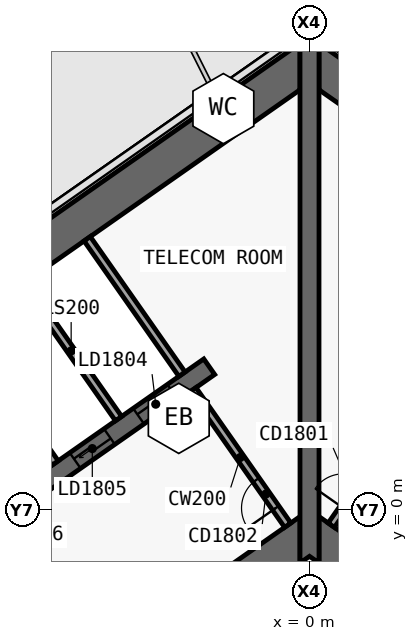
"""IFC4 building model, lengths in metres.
Left out: names, types, materials, properties, quantities, classifications, styles, units other than length and angle.
Written with IfcOpenShell. Run it as: python <this file> out.ifc"""

import sys

from ifc_helpers import new_model, si_unit, direction, frame, frame_2d, origin, place, context, subcontext, project, spatial, polyline, rectangle, outline, extrude, element, fill, save


model = new_model("IFC4")
c1 = context("Model", 3, precision=1e-05, world=origin(), true_north=direction((0.0, 1.0)))
c2 = subcontext(c1, "Body", "Model", "MODEL_VIEW")
j1 = project(units=[si_unit("LENGTHUNIT", "METRE"), si_unit("PLANEANGLEUNIT", "RADIAN")], contexts=[c1])
p1 = place(None, origin())
s1 = spatial("IfcSite", under=j1, at=p1, CompositionType="ELEMENT")
p2 = place(p1, origin())
s2 = spatial("IfcBuilding", under=s1, at=p2, CompositionType="ELEMENT")
p3 = place(p2, frame((0.0, 0.0, 97.7)))
s3 = spatial("IfcBuildingStorey", under=s2, at=p3, CompositionType="ELEMENT", Elevation=97.7)
p4 = place(p3, frame((0.037, 11.867, 0.0), z_axis=(0.0, 0.0, 1.0), x_axis=(-0.819155306259, -0.573571777746, 0.0)))
e1 = element("IfcWall", 1, at=p4, inside=s3, PredefinedType="SHEAR", context=c2, shape_type="SweptSolid", body=[
    extrude(outline(polyline([(33.837, 0.5), (0.7, 0.5), (0.0, -0.5), (33.837, -0.5), (33.837, 0.5)])), origin(), (0.0, 0.0, 1.0), 3.6),
])
p5 = place(p3, frame((0.037, -0.585, 0.0), z_axis=(0.0, 0.0, 1.0), x_axis=(-0.819157152511, -0.573569140985, 0.0)))
e2 = element("IfcWall", 2, at=p5, inside=s3, PredefinedType="SHEAR", context=c2, shape_type="SweptSolid", body=[
    extrude(outline(polyline([(26.695, 0.5), (0.7, 0.5), (0.0, -0.5), (26.695, -0.5), (26.695, 0.5)])), origin(), (0.0, 0.0, 1.0), 3.6),
])
p6 = place(p5, frame((2.995, 0.0, 0.0)))
e3 = element("IfcOpeningElement", 3, at=p6, cuts=e2, PredefinedType="OPENING", context=c2, shape_type="SweptSolid", body=[
    extrude(rectangle(XDim=2.4, YDim=2.1, at=frame_2d((1.2, 1.05))), frame((0.0, 0.51, 0.0), z_axis=(0.0, -1.0, 0.0), x_axis=(1.0, 0.0, 0.0)), (0.0, 0.0, 1.0), 1.02),
])
p7 = place(p5, frame((11.995, 0.0, 0.0)))
e4 = element("IfcOpeningElement", 4, at=p7, cuts=e2, PredefinedType="OPENING", context=c2, shape_type="SweptSolid", body=[
    extrude(rectangle(XDim=2.4, YDim=2.1, at=frame_2d((1.2, 1.05))), frame((0.0, 0.51, 0.0), z_axis=(0.0, -1.0, 0.0), x_axis=(1.0, 0.0, 0.0)), (0.0, 0.0, 1.0), 1.02),
])
p8 = place(p3, frame((-2.638, 3.768, 0.0), z_axis=(0.0, 0.0, 1.0), x_axis=(-0.819148977158, -0.573580816643, 0.0)))
e5 = element("IfcWall", 5, at=p8, inside=s3, PredefinedType="SHEAR", context=c2, shape_type="SweptSolid", body=[
    extrude(outline(polyline([(26.0, 0.25), (0.0, 0.25), (0.0, -0.25), (26.0, -0.25), (26.0, 0.25)])), origin(), (0.0, 0.0, 1.0), 3.6),
])
p9 = place(p8, frame((1.169, 0.0, 0.0)))
e6 = element("IfcOpeningElement", 6, at=p9, cuts=e5, PredefinedType="OPENING", context=c2, shape_type="SweptSolid", body=[
    extrude(rectangle(XDim=1.1, YDim=2.1, at=frame_2d((0.55, 1.05))), frame((0.0, 0.26, 0.0), z_axis=(0.0, -1.0, 0.0), x_axis=(1.0, 0.0, 0.0)), (0.0, 0.0, 1.0), 0.52),
])
p10 = place(p8, frame((3.206, 0.0, 0.0)))
e7 = element("IfcOpeningElement", 7, at=p10, cuts=e5, PredefinedType="OPENING", context=c2, shape_type="SweptSolid", body=[
    extrude(rectangle(XDim=1.1, YDim=2.1, at=frame_2d((0.55, 1.05))), frame((0.0, 0.26, 0.0), z_axis=(0.0, -1.0, 0.0), x_axis=(1.0, 0.0, 0.0)), (0.0, 0.0, 1.0), 0.52),
])
p11 = place(p8, frame((5.244, 0.0, 0.0)))
e8 = element("IfcOpeningElement", 8, at=p11, cuts=e5, PredefinedType="OPENING", context=c2, shape_type="SweptSolid", body=[
    extrude(rectangle(XDim=1.1, YDim=2.1, at=frame_2d((0.55, 1.05))), frame((0.0, 0.26, 0.0), z_axis=(0.0, -1.0, 0.0), x_axis=(1.0, 0.0, 0.0)), (0.0, 0.0, 1.0), 0.52),
])
p12 = place(p8, frame((7.281, 0.0, 0.0)))
e9 = element("IfcOpeningElement", 9, at=p12, cuts=e5, PredefinedType="OPENING", context=c2, shape_type="SweptSolid", body=[
    extrude(rectangle(XDim=1.1, YDim=2.1, at=frame_2d((0.55, 1.05))), frame((0.0, 0.26, 0.0), z_axis=(0.0, -1.0, 0.0), x_axis=(1.0, 0.0, 0.0)), (0.0, 0.0, 1.0), 0.52),
])
p13 = place(p8, frame((9.688, 0.0, 0.0)))
e10 = element("IfcOpeningElement", 10, at=p13, cuts=e5, PredefinedType="OPENING", context=c2, shape_type="SweptSolid", body=[
    extrude(rectangle(XDim=1.1, YDim=2.1, at=frame_2d((0.55, 1.05))), frame((0.0, 0.26, 0.0), z_axis=(0.0, -1.0, 0.0), x_axis=(1.0, 0.0, 0.0)), (0.0, 0.0, 1.0), 0.52),
])
p14 = place(p8, frame((11.863, 0.0, 0.0)))
e11 = element("IfcOpeningElement", 11, at=p14, cuts=e5, PredefinedType="OPENING", context=c2, shape_type="SweptSolid", body=[
    extrude(rectangle(XDim=1.1, YDim=2.1, at=frame_2d((0.55, 1.05))), frame((0.0, 0.26, 0.0), z_axis=(0.0, -1.0, 0.0), x_axis=(1.0, 0.0, 0.0)), (0.0, 0.0, 1.0), 0.52),
])
p15 = place(p8, frame((14.038, 0.0, 0.0)))
e12 = element("IfcOpeningElement", 12, at=p15, cuts=e5, PredefinedType="OPENING", context=c2, shape_type="SweptSolid", body=[
    extrude(rectangle(XDim=1.1, YDim=2.1, at=frame_2d((0.55, 1.05))), frame((0.0, 0.26, 0.0), z_axis=(0.0, -1.0, 0.0), x_axis=(1.0, 0.0, 0.0)), (0.0, 0.0, 1.0), 0.52),
])
p16 = place(p8, frame((16.212, 0.0, 0.0)))
e13 = element("IfcOpeningElement", 13, at=p16, cuts=e5, PredefinedType="OPENING", context=c2, shape_type="SweptSolid", body=[
    extrude(rectangle(XDim=1.1, YDim=2.1, at=frame_2d((0.55, 1.05))), frame((0.0, 0.26, 0.0), z_axis=(0.0, -1.0, 0.0), x_axis=(1.0, 0.0, 0.0)), (0.0, 0.0, 1.0), 0.52),
])
p17 = place(p3, frame((-0.037, 11.867, 0.0), z_axis=(0.0, 0.0, 1.0), x_axis=(0.819155306259, -0.573571777746, 0.0)))
e14 = element("IfcWall", 14, at=p17, inside=s3, PredefinedType="SHEAR", context=c2, shape_type="SweptSolid", body=[
    extrude(outline(polyline([(33.837, 0.5), (0.0, 0.5), (0.7, -0.5), (33.837, -0.5), (33.837, 0.5)])), origin(), (0.0, 0.0, 1.0), 3.6),
])
p18 = place(p3, frame((-0.037, -0.585, 0.0), z_axis=(0.0, 0.0, 1.0), x_axis=(0.819157152511, -0.573569140985, 0.0)))
e15 = element("IfcWall", 15, at=p18, inside=s3, PredefinedType="SHEAR", context=c2, shape_type="SweptSolid", body=[
    extrude(outline(polyline([(26.695, 0.5), (0.0, 0.5), (0.7, -0.5), (26.695, -0.5), (26.695, 0.5)])), origin(), (0.0, 0.0, 1.0), 3.6),
])
p19 = place(p18, frame((1.245, 0.0, 0.0)))
e16 = element("IfcOpeningElement", 16, at=p19, cuts=e15, PredefinedType="OPENING", context=c2, shape_type="SweptSolid", body=[
    extrude(rectangle(XDim=1.5, YDim=2.1, at=frame_2d((0.75, 1.05))), frame((0.0, 0.51, 0.0), z_axis=(0.0, -1.0, 0.0), x_axis=(1.0, 0.0, 0.0)), (0.0, 0.0, 1.0), 1.02),
])
p20 = place(p18, frame((12.445, 0.0, 0.0)))
e17 = element("IfcOpeningElement", 17, at=p20, cuts=e15, PredefinedType="OPENING", context=c2, shape_type="SweptSolid", body=[
    extrude(rectangle(XDim=1.5, YDim=2.1, at=frame_2d((0.75, 1.05))), frame((0.0, 0.51, 0.0), z_axis=(0.0, -1.0, 0.0), x_axis=(1.0, 0.0, 0.0)), (0.0, 0.0, 1.0), 1.02),
])
p21 = place(p3, frame((0.0, -1.396, 0.0), z_axis=(0.0, 0.0, 1.0), x_axis=(0.0, 1.0, 0.0)))
e18 = element("IfcWall", 18, at=p21, inside=s3, PredefinedType="SHEAR", context=c2, shape_type="SweptSolid", body=[
    extrude(outline(polyline([(0.0, -0.25), (0.175, -0.25), (1.221, -0.25), (12.452, -0.25), (13.848, -0.25), (13.857, -0.25), (13.968, -0.172), (13.848, 0.0), (13.968, 0.172), (13.857, 0.25), (13.848, 0.25), (12.452, 0.25), (1.221, 0.25), (0.175, 0.25), (0.0, 0.25), (0.175, 0.0), (0.0, -0.25)])), origin(), (0.0, 0.0, 1.0), 3.6),
])
p22 = place(p3, frame((-5.024, 2.403, 0.0), z_axis=(0.0, 0.0, 1.0), x_axis=(-0.573530143085, 0.819184457233, 0.0)))
e19 = element("IfcWall", 19, at=p22, inside=s3, PredefinedType="SOLIDWALL", context=c2, shape_type="SweptSolid", body=[
    extrude(rectangle(XDim=4.35, YDim=0.2, at=frame_2d((2.175, 0.0))), origin(), (0.0, 0.0, 1.0), 3.6),
])
p23 = place(p3, frame((-6.693, 1.234, 0.0), z_axis=(0.0, 0.0, 1.0), x_axis=(-0.573594173421, 0.819139624372, 0.0)))
e20 = element("IfcWall", 20, at=p23, inside=s3, PredefinedType="SOLIDWALL", context=c2, shape_type="SweptSolid", body=[
    extrude(rectangle(XDim=4.35, YDim=0.2, at=frame_2d((2.175, 0.0))), origin(), (0.0, 0.0, 1.0), 3.6),
])
p24 = place(p3, frame((-0.573, -0.402, 0.0), z_axis=(0.0, 0.0, 1.0), x_axis=(-0.57356780395, 0.819158088694, 0.0)))
e21 = element("IfcWall", 21, at=p24, inside=s3, PredefinedType="SOLIDWALL", context=c2, shape_type="SweptSolid", body=[
    extrude(rectangle(XDim=4.35, YDim=0.2, at=frame_2d((2.175, 0.0))), origin(), (0.0, 0.0, 1.0), 3.32),
])
p25 = place(p24, frame((0.55, 0.0, 0.0)))
e22 = element("IfcOpeningElement", 22, at=p25, cuts=e21, PredefinedType="OPENING", context=c2, shape_type="SweptSolid", body=[
    extrude(rectangle(XDim=0.9, YDim=2.1, at=frame_2d((0.45, 1.05))), frame((0.0, 0.11, 0.0), z_axis=(0.0, -1.0, 0.0), x_axis=(1.0, 0.0, 0.0)), (0.0, 0.0, 1.0), 0.22),
])
p26 = place(p3, frame((-3.355, 3.571, 0.0), z_axis=(0.0, 0.0, 1.0), x_axis=(-0.57356780395, 0.819158088694, 0.0)))
e23 = element("IfcWall", 23, at=p26, inside=s3, PredefinedType="SOLIDWALL", context=c2, shape_type="SweptSolid", body=[
    extrude(rectangle(XDim=4.35, YDim=0.2, at=frame_2d((2.175, 0.0))), origin(), (0.0, 0.0, 1.0), 3.32),
])
p27 = place(p3, frame((0.573, -0.402, 0.0), z_axis=(0.0, 0.0, 1.0), x_axis=(0.57356780395, 0.819158088694, 0.0)))
e24 = element("IfcWall", 24, at=p27, inside=s3, PredefinedType="SOLIDWALL", context=c2, shape_type="SweptSolid", body=[
    extrude(rectangle(XDim=4.35, YDim=0.2, at=frame_2d((2.175, 0.0))), origin(), (0.0, 0.0, 1.0), 3.32),
])
p28 = place(p27, frame((0.55, 0.0, 0.0)))
e25 = element("IfcOpeningElement", 25, at=p28, cuts=e24, PredefinedType="OPENING", context=c2, shape_type="SweptSolid", body=[
    extrude(rectangle(XDim=0.9, YDim=2.1, at=frame_2d((0.45, 1.05))), frame((0.0, 0.11, 0.0), z_axis=(0.0, -1.0, 0.0), x_axis=(1.0, 0.0, 0.0)), (0.0, 0.0, 1.0), 0.22),
])
p29 = place(p9, origin())
e26 = element("IfcDoor", 26, at=p29, inside=s3, OperationType="SLIDING_TO_LEFT", PredefinedType="DOOR", context=c2, shape_type="SweptSolid", body=[
    extrude(rectangle(XDim=1.1, YDim=2.1, at=frame_2d((0.55, 1.05))), frame((0.0, 0.025, 0.0), z_axis=(0.0, -1.0, 0.0), x_axis=(1.0, 0.0, 0.0)), (0.0, 0.0, 1.0), 0.05),
])
fill(e6, e26)
p30 = place(p10, origin())
e27 = element("IfcDoor", 27, at=p30, inside=s3, OperationType="SLIDING_TO_RIGHT", PredefinedType="DOOR", context=c2, shape_type="SweptSolid", body=[
    extrude(rectangle(XDim=1.1, YDim=2.1, at=frame_2d((0.55, 1.05))), frame((0.0, 0.025, 0.0), z_axis=(0.0, -1.0, 0.0), x_axis=(1.0, 0.0, 0.0)), (0.0, 0.0, 1.0), 0.05),
])
fill(e7, e27)
p31 = place(p25, origin())
e28 = element("IfcDoor", 28, at=p31, inside=s3, OperationType="SINGLE_SWING_RIGHT", PredefinedType="DOOR", context=c2, shape_type="SweptSolid", body=[
    extrude(rectangle(XDim=0.9, YDim=2.1, at=frame_2d((0.45, 1.05))), frame((0.0, 0.025, 0.0), z_axis=(0.0, -1.0, 0.0), x_axis=(1.0, 0.0, 0.0)), (0.0, 0.0, 1.0), 0.05),
])
fill(e22, e28)
save(model, sys.argv[1])
